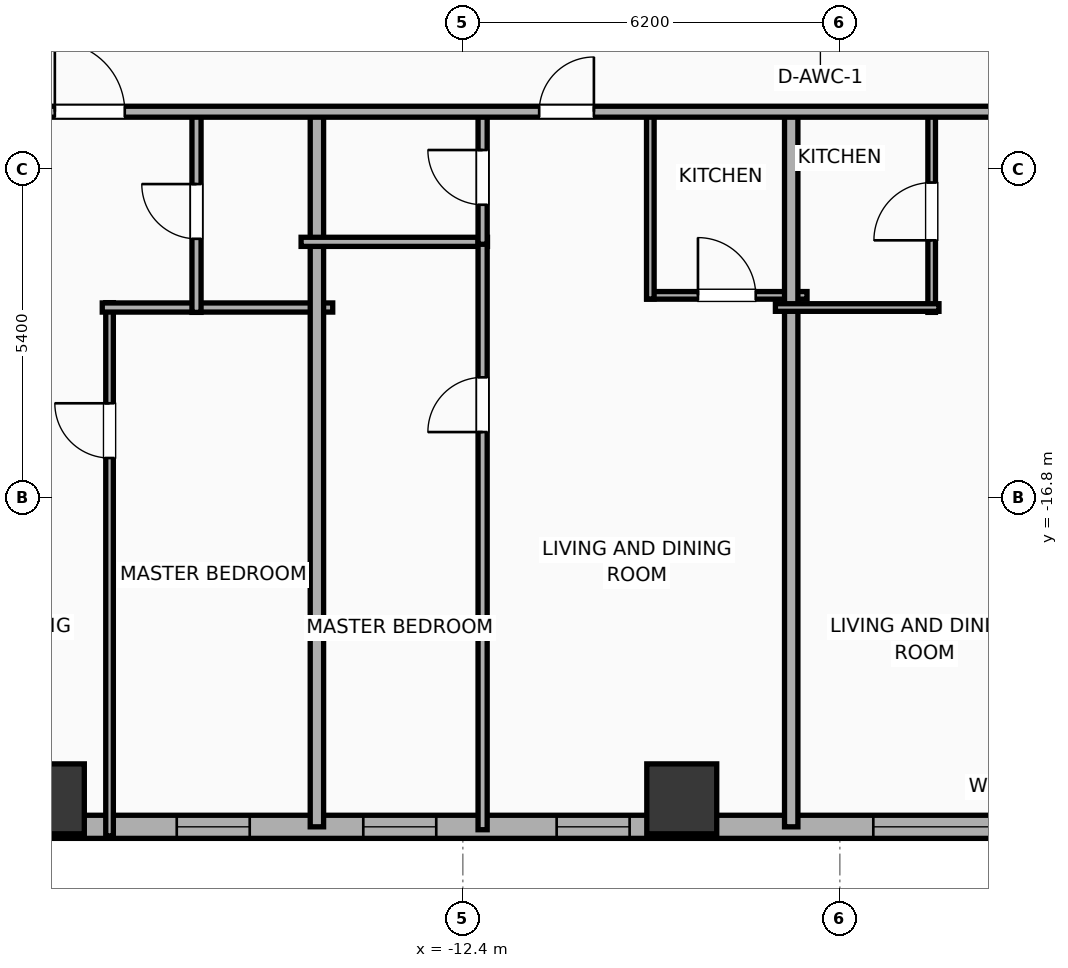
"""IFC4 building model, lengths in metres.
Left out: names, types, materials, properties, quantities, classifications, styles, units other than length and angle.
Written with IfcOpenShell. Run it as: python <this file> out.ifc"""

import sys

from ifc_helpers import new_model, si_unit, direction, frame, frame_2d, origin, origin_2d, place, context, subcontext, project, spatial, rectangle, hollow_rectangle, extrude, element, fill, save


model = new_model("IFC4")
c1 = context("Model", 3, precision=1e-05, world=origin(), true_north=direction((0.0, 1.0)))
c2 = subcontext(c1, "Body", "Model", "MODEL_VIEW")
j1 = project(units=[si_unit("LENGTHUNIT", "METRE"), si_unit("PLANEANGLEUNIT", "RADIAN")], contexts=[c1])
p1 = place(None, origin())
s1 = spatial("IfcSite", under=j1, at=p1, CompositionType="ELEMENT")
p2 = place(p1, origin())
s2 = spatial("IfcBuilding", under=s1, at=p2, CompositionType="ELEMENT")
p3 = place(p2, frame((0.0, 0.0, 57.2)))
s3 = spatial("IfcBuildingStorey", under=s2, at=p3, CompositionType="ELEMENT", Elevation=57.2)
for number, where, z_axis, x_axis in (
    (1, (-19.2, -21.75, 0.0), (0.0, 0.0, 1.0), (1.0, 0.0, 0.0)),
    (2, (-8.8, -21.75, 0.0), (0.0, 0.0, 1.0), (1.0, 0.0, 0.0)),
):
    element("IfcColumn", number, at=place(p3, frame(where, z_axis=z_axis, x_axis=x_axis)), inside=s3, PredefinedType="COLUMN", context=c2, shape_type="SweptSolid", body=[
        extrude(hollow_rectangle(XDim=1.15, YDim=1.15, WallThickness=0.04, at=origin_2d()), origin(), (0.0, 0.0, 1.0), 3.9),
    ])
p4 = place(p3, frame((22.381, -22.21, 0.0), z_axis=(0.0, 0.0, 1.0), x_axis=(-1.0, 0.0, 0.0)))
e3 = element("IfcWall", 3, at=p4, inside=s3, PredefinedType="ELEMENTEDWALL", context=c2, shape_type="SweptSolid", body=[
    extrude(rectangle(XDim=51.963, YDim=0.38, at=frame_2d((25.981, 0.0))), origin(), (0.0, 0.0, 1.0), 3.65),
])
p5 = place(p4, frame((6.61, 0.0, 0.75)))
e4 = element("IfcOpeningElement", 4, at=p5, cuts=e3, PredefinedType="OPENING", context=c2, shape_type="SweptSolid", body=[
    extrude(rectangle(XDim=2.4, YDim=2.1, at=frame_2d((1.2, 1.05))), frame((0.0, 0.2, 0.0), z_axis=(0.0, -1.0, 0.0), x_axis=(1.0, 0.0, 0.0)), (0.0, 0.0, 1.0), 0.4),
])
p6 = place(p4, frame((25.631, 0.0, 0.75)))
e5 = element("IfcOpeningElement", 5, at=p6, cuts=e3, PredefinedType="OPENING", context=c2, shape_type="SweptSolid", body=[
    extrude(rectangle(XDim=2.4, YDim=2.1, at=frame_2d((1.2, 1.05))), frame((0.0, 0.2, 0.0), z_axis=(0.0, -1.0, 0.0), x_axis=(1.0, 0.0, 0.0)), (0.0, 0.0, 1.0), 0.4),
])
p7 = place(p4, frame((49.132, 0.0, 0.75)))
e6 = element("IfcOpeningElement", 6, at=p7, cuts=e3, PredefinedType="OPENING", context=c2, shape_type="SweptSolid", body=[
    extrude(rectangle(XDim=1.2, YDim=2.05, at=frame_2d((0.6, 1.025))), frame((0.0, 0.2, 0.0), z_axis=(0.0, -1.0, 0.0), x_axis=(1.0, 0.0, 0.0)), (0.0, 0.0, 1.0), 0.4),
])
p8 = place(p4, frame((46.086, 0.0, 0.75)))
e7 = element("IfcOpeningElement", 7, at=p8, cuts=e3, PredefinedType="OPENING", context=c2, shape_type="SweptSolid", body=[
    extrude(rectangle(XDim=1.2, YDim=2.05, at=frame_2d((0.6, 1.025))), frame((0.0, 0.2, 0.0), z_axis=(0.0, -1.0, 0.0), x_axis=(1.0, 0.0, 0.0)), (0.0, 0.0, 1.0), 0.4),
])
p9 = place(p4, frame((42.426, 0.0, 0.75)))
e8 = element("IfcOpeningElement", 8, at=p9, cuts=e3, PredefinedType="OPENING", context=c2, shape_type="SweptSolid", body=[
    extrude(rectangle(XDim=1.2, YDim=2.05, at=frame_2d((0.6, 1.025))), frame((0.0, 0.2, 0.0), z_axis=(0.0, -1.0, 0.0), x_axis=(1.0, 0.0, 0.0)), (0.0, 0.0, 1.0), 0.4),
])
p10 = place(p4, frame((38.286, 0.0, 0.75)))
e9 = element("IfcOpeningElement", 9, at=p10, cuts=e3, PredefinedType="OPENING", context=c2, shape_type="SweptSolid", body=[
    extrude(rectangle(XDim=1.2, YDim=2.05, at=frame_2d((0.6, 1.025))), frame((0.0, 0.2, 0.0), z_axis=(0.0, -1.0, 0.0), x_axis=(1.0, 0.0, 0.0)), (0.0, 0.0, 1.0), 0.4),
])
p11 = place(p4, frame((35.219, 0.0, 0.75)))
e10 = element("IfcOpeningElement", 10, at=p11, cuts=e3, PredefinedType="OPENING", context=c2, shape_type="SweptSolid", body=[
    extrude(rectangle(XDim=1.2, YDim=2.05, at=frame_2d((0.6, 1.025))), frame((0.0, 0.2, 0.0), z_axis=(0.0, -1.0, 0.0), x_axis=(1.0, 0.0, 0.0)), (0.0, 0.0, 1.0), 0.4),
])
p12 = place(p4, frame((32.039, 0.0, 0.75)))
e11 = element("IfcOpeningElement", 11, at=p12, cuts=e3, PredefinedType="OPENING", context=c2, shape_type="SweptSolid", body=[
    extrude(rectangle(XDim=1.2, YDim=2.05, at=frame_2d((0.6, 1.025))), frame((0.0, 0.2, 0.0), z_axis=(0.0, -1.0, 0.0), x_axis=(1.0, 0.0, 0.0)), (0.0, 0.0, 1.0), 0.4),
])
p13 = place(p4, frame((22.686, 0.0, 0.75)))
e12 = element("IfcOpeningElement", 12, at=p13, cuts=e3, PredefinedType="OPENING", context=c2, shape_type="SweptSolid", body=[
    extrude(rectangle(XDim=1.2, YDim=2.05, at=frame_2d((0.6, 1.025))), frame((0.0, 0.2, 0.0), z_axis=(0.0, -1.0, 0.0), x_axis=(1.0, 0.0, 0.0)), (0.0, 0.0, 1.0), 0.4),
])
p14 = place(p4, frame((18.786, 0.0, 0.75)))
e13 = element("IfcOpeningElement", 13, at=p14, cuts=e3, PredefinedType="OPENING", context=c2, shape_type="SweptSolid", body=[
    extrude(rectangle(XDim=1.2, YDim=2.05, at=frame_2d((0.6, 1.025))), frame((0.0, 0.2, 0.0), z_axis=(0.0, -1.0, 0.0), x_axis=(1.0, 0.0, 0.0)), (0.0, 0.0, 1.0), 0.4),
])
p15 = place(p4, frame((14.886, 0.0, 0.75)))
e14 = element("IfcOpeningElement", 14, at=p15, cuts=e3, PredefinedType="OPENING", context=c2, shape_type="SweptSolid", body=[
    extrude(rectangle(XDim=1.2, YDim=2.05, at=frame_2d((0.6, 1.025))), frame((0.0, 0.2, 0.0), z_axis=(0.0, -1.0, 0.0), x_axis=(1.0, 0.0, 0.0)), (0.0, 0.0, 1.0), 0.4),
])
p16 = place(p4, frame((11.826, 0.0, 0.75)))
e15 = element("IfcOpeningElement", 15, at=p16, cuts=e3, PredefinedType="OPENING", context=c2, shape_type="SweptSolid", body=[
    extrude(rectangle(XDim=1.2, YDim=2.05, at=frame_2d((0.6, 1.025))), frame((0.0, 0.2, 0.0), z_axis=(0.0, -1.0, 0.0), x_axis=(1.0, 0.0, 0.0)), (0.0, 0.0, 1.0), 0.4),
])
p17 = place(p4, frame((2.836, 0.0, 0.75)))
e16 = element("IfcOpeningElement", 16, at=p17, cuts=e3, PredefinedType="OPENING", context=c2, shape_type="SweptSolid", body=[
    extrude(rectangle(XDim=1.2, YDim=2.05, at=frame_2d((0.6, 1.025))), frame((0.0, 0.2, 0.0), z_axis=(0.0, -1.0, 0.0), x_axis=(1.0, 0.0, 0.0)), (0.0, 0.0, 1.0), 0.4),
])
p18 = place(p3, frame((-18.21, -22.36, 0.0), z_axis=(0.0, 0.0, 1.0), x_axis=(0.0, 1.0, 0.0)))
e17 = element("IfcWall", 17, at=p18, inside=s3, PredefinedType="PARTITIONING", context=c2, shape_type="SweptSolid", body=[
    extrude(rectangle(XDim=8.77, YDim=0.125, at=frame_2d((4.385, 0.0))), origin(), (0.0, 0.0, 1.0), 3.65),
])
p19 = place(p18, frame((6.215, 0.0, 0.0)))
e18 = element("IfcOpeningElement", 18, at=p19, cuts=e17, PredefinedType="OPENING", context=c2, shape_type="SweptSolid", body=[
    extrude(rectangle(XDim=0.9, YDim=2.05, at=frame_2d((0.45, 1.025))), frame((0.0, 0.073, 0.0), z_axis=(0.0, -1.0, 0.0), x_axis=(1.0, 0.0, 0.0)), (0.0, 0.0, 1.0), 0.145),
])
p20 = place(p3, frame((-18.33, -13.67, 0.0), z_axis=(0.0, 0.0, 1.0), x_axis=(1.0, 0.0, 0.0)))
e19 = element("IfcWall", 19, at=p20, inside=s3, PredefinedType="PLUMBINGWALL", context=c2, shape_type="SweptSolid", body=[
    extrude(rectangle(XDim=3.79, YDim=0.15, at=frame_2d((1.895, 0.0))), origin(), (0.0, 0.0, 1.0), 3.65),
])
p21 = place(p3, frame((-16.78, -13.75, 0.0), z_axis=(0.0, 0.0, 1.0), x_axis=(0.0, 1.0, 0.0)))
e20 = element("IfcWall", 20, at=p21, inside=s3, PredefinedType="PLUMBINGWALL", context=c2, shape_type="SweptSolid", body=[
    extrude(rectangle(XDim=3.32, YDim=0.15, at=frame_2d((1.66, 0.0))), origin(), (0.0, 0.0, 1.0), 3.65),
])
p22 = place(p21, frame((1.21, 0.0, 0.0)))
e21 = element("IfcOpeningElement", 21, at=p22, cuts=e20, PredefinedType="OPENING", context=c2, shape_type="SweptSolid", body=[
    extrude(rectangle(XDim=0.9, YDim=2.05, at=frame_2d((0.45, 1.025))), frame((0.0, 0.085, 0.0), z_axis=(0.0, -1.0, 0.0), x_axis=(1.0, 0.0, 0.0)), (0.0, 0.0, 1.0), 0.17),
])
p23 = place(p3, frame((-14.8, -22.21, 0.0), z_axis=(0.0, 0.0, 1.0), x_axis=(0.0, 1.0, 0.0)))
e22 = element("IfcWall", 22, at=p23, inside=s3, PredefinedType="PARTITIONING", context=c2, shape_type="SweptSolid", body=[
    extrude(rectangle(XDim=11.84, YDim=0.22, at=frame_2d((5.92, 0.0))), origin(), (0.0, 0.0, 1.0), 3.65),
])
p24 = place(p3, frame((-15.06, -12.59, 0.0), z_axis=(0.0, 0.0, 1.0), x_axis=(1.0, 0.0, 0.0)))
e23 = element("IfcWall", 23, at=p24, inside=s3, PredefinedType="PLUMBINGWALL", context=c2, shape_type="SweptSolid", body=[
    extrude(rectangle(XDim=3.065, YDim=0.15, at=frame_2d((1.532, 0.0))), origin(), (0.0, 0.0, 1.0), 3.65),
])
p25 = place(p3, frame((-12.075, -22.258, 0.0), z_axis=(0.0, 0.0, 1.0), x_axis=(0.0, 1.0, 0.0)))
e24 = element("IfcWall", 24, at=p25, inside=s3, PredefinedType="PLUMBINGWALL", context=c2, shape_type="SweptSolid", body=[
    extrude(rectangle(XDim=9.708, YDim=0.15, at=frame_2d((4.854, 0.0))), origin(), (0.0, 0.0, 1.0), 3.65),
])
p26 = place(p25, frame((6.54, 0.0, 0.0)))
e25 = element("IfcOpeningElement", 25, at=p26, cuts=e24, PredefinedType="OPENING", context=c2, shape_type="SweptSolid", body=[
    extrude(rectangle(XDim=0.9, YDim=2.05, at=frame_2d((0.45, 1.025))), frame((0.0, 0.085, 0.0), z_axis=(0.0, -1.0, 0.0), x_axis=(1.0, 0.0, 0.0)), (0.0, 0.0, 1.0), 0.17),
])
p27 = place(p3, frame((-12.075, -12.63, 0.0), z_axis=(0.0, 0.0, 1.0), x_axis=(0.0, 1.0, 0.0)))
e26 = element("IfcWall", 26, at=p27, inside=s3, PredefinedType="PLUMBINGWALL", context=c2, shape_type="SweptSolid", body=[
    extrude(rectangle(XDim=2.2, YDim=0.15, at=frame_2d((1.1, 0.0))), origin(), (0.0, 0.0, 1.0), 3.65),
])
p28 = place(p27, frame((0.65, 0.0, 0.0)))
e27 = element("IfcOpeningElement", 27, at=p28, cuts=e26, PredefinedType="OPENING", context=c2, shape_type="SweptSolid", body=[
    extrude(rectangle(XDim=0.9, YDim=2.05, at=frame_2d((0.45, 1.025))), frame((0.0, 0.085, 0.0), z_axis=(0.0, -1.0, 0.0), x_axis=(1.0, 0.0, 0.0)), (0.0, 0.0, 1.0), 0.17),
])
p29 = place(p3, frame((-9.377, -13.47, 0.0), z_axis=(0.0, 0.0, 1.0), x_axis=(1.0, 0.0, 0.0)))
e28 = element("IfcWall", 28, at=p29, inside=s3, PredefinedType="PARTITIONING", context=c2, shape_type="SweptSolid", body=[
    extrude(rectangle(XDim=2.637, YDim=0.125, at=frame_2d((1.318, 0.0))), origin(), (0.0, 0.0, 1.0), 3.65),
])
p30 = place(p29, frame((0.844, 0.0, 0.0)))
e29 = element("IfcOpeningElement", 29, at=p30, cuts=e28, PredefinedType="OPENING", context=c2, shape_type="SweptSolid", body=[
    extrude(rectangle(XDim=0.95, YDim=2.05, at=frame_2d((0.475, 1.025))), frame((0.0, 0.073, 0.0), z_axis=(0.0, -1.0, 0.0), x_axis=(1.0, 0.0, 0.0)), (0.0, 0.0, 1.0), 0.145),
])
p31 = place(p3, frame((-9.317, -13.53, 0.0), z_axis=(0.0, 0.0, 1.0), x_axis=(0.0, 1.0, 0.0)))
e30 = element("IfcWall", 30, at=p31, inside=s3, PredefinedType="PARTITIONING", context=c2, shape_type="SweptSolid", body=[
    extrude(rectangle(XDim=3.1, YDim=0.125, at=frame_2d((1.55, 0.0))), origin(), (0.0, 0.0, 1.0), 3.65),
])
p32 = place(p3, frame((-7.0, -22.21, 0.0), z_axis=(0.0, 0.0, 1.0), x_axis=(0.0, 1.0, 0.0)))
e31 = element("IfcWall", 31, at=p32, inside=s3, PredefinedType="PARTITIONING", context=c2, shape_type="SweptSolid", body=[
    extrude(rectangle(XDim=11.84, YDim=0.22, at=frame_2d((5.92, 0.0))), origin(), (0.0, 0.0, 1.0), 3.65),
])
p33 = place(p3, frame((-4.69, -13.75, 0.0), z_axis=(0.0, 0.0, 1.0), x_axis=(0.0, 1.0, 0.0)))
e32 = element("IfcWall", 32, at=p33, inside=s3, PredefinedType="PARTITIONING", context=c2, shape_type="SweptSolid", body=[
    extrude(rectangle(XDim=3.32, YDim=0.125, at=frame_2d((1.66, 0.0))), origin(), (0.0, 0.0, 1.0), 3.65),
])
p34 = place(p33, frame((1.185, 0.0, 0.0)))
e33 = element("IfcOpeningElement", 33, at=p34, cuts=e32, PredefinedType="OPENING", context=c2, shape_type="SweptSolid", body=[
    extrude(rectangle(XDim=0.95, YDim=2.05, at=frame_2d((0.475, 1.025))), frame((0.0, 0.073, 0.0), z_axis=(0.0, -1.0, 0.0), x_axis=(1.0, 0.0, 0.0)), (0.0, 0.0, 1.0), 0.145),
])
p35 = place(p3, frame((-7.26, -13.67, 0.0), z_axis=(0.0, 0.0, 1.0), x_axis=(1.0, 0.0, 0.0)))
e34 = element("IfcWall", 34, at=p35, inside=s3, PredefinedType="PARTITIONING", context=c2, shape_type="SweptSolid", body=[
    extrude(rectangle(XDim=2.69, YDim=0.125, at=frame_2d((1.345, 0.0))), origin(), (0.0, 0.0, 1.0), 3.65),
])
p36 = place(p3, frame((-33.41, -10.45, 0.0), z_axis=(0.0, 0.0, 1.0), x_axis=(1.0, 0.0, 0.0)))
e35 = element("IfcWall", 35, at=p36, inside=s3, PredefinedType="PARTITIONING", context=c2, shape_type="SweptSolid", body=[
    extrude(rectangle(XDim=59.62, YDim=0.18, at=frame_2d((29.81, 0.0))), origin(), (0.0, 0.0, 1.0), 3.65),
])
p37 = place(p36, frame((5.321, 0.0, 0.0)))
e36 = element("IfcOpeningElement", 36, at=p37, cuts=e35, PredefinedType="OPENING", context=c2, shape_type="SweptSolid", body=[
    extrude(rectangle(XDim=1.15, YDim=2.05, at=frame_2d((0.575, 1.025))), frame((0.0, 0.1, 0.0), z_axis=(0.0, -1.0, 0.0), x_axis=(1.0, 0.0, 0.0)), (0.0, 0.0, 1.0), 0.2),
])
p38 = place(p36, frame((14.3, 0.0, 0.0)))
e37 = element("IfcOpeningElement", 37, at=p38, cuts=e35, PredefinedType="OPENING", context=c2, shape_type="SweptSolid", body=[
    extrude(rectangle(XDim=1.15, YDim=2.05, at=frame_2d((0.575, 1.025))), frame((0.0, 0.1, 0.0), z_axis=(0.0, -1.0, 0.0), x_axis=(1.0, 0.0, 0.0)), (0.0, 0.0, 1.0), 0.2),
])
p39 = place(p36, frame((22.265, 0.0, 0.0)))
e38 = element("IfcOpeningElement", 38, at=p39, cuts=e35, PredefinedType="OPENING", context=c2, shape_type="SweptSolid", body=[
    extrude(rectangle(XDim=0.9, YDim=2.05, at=frame_2d((0.45, 1.025))), frame((0.0, 0.1, 0.0), z_axis=(0.0, -1.0, 0.0), x_axis=(1.0, 0.0, 0.0)), (0.0, 0.0, 1.0), 0.2),
])
p40 = place(p36, frame((29.903, 0.0, 0.0)))
e39 = element("IfcOpeningElement", 39, at=p40, cuts=e35, PredefinedType="OPENING", context=c2, shape_type="SweptSolid", body=[
    extrude(rectangle(XDim=1.15, YDim=2.05, at=frame_2d((0.575, 1.025))), frame((0.0, 0.1, 0.0), z_axis=(0.0, -1.0, 0.0), x_axis=(1.0, 0.0, 0.0)), (0.0, 0.0, 1.0), 0.2),
])
p41 = place(p36, frame((37.701, 0.0, 0.0)))
e40 = element("IfcOpeningElement", 40, at=p41, cuts=e35, PredefinedType="OPENING", context=c2, shape_type="SweptSolid", body=[
    extrude(rectangle(XDim=1.15, YDim=2.05, at=frame_2d((0.575, 1.025))), frame((0.0, 0.1, 0.0), z_axis=(0.0, -1.0, 0.0), x_axis=(1.0, 0.0, 0.0)), (0.0, 0.0, 1.0), 0.2),
])
p42 = place(p36, frame((45.654, 0.0, 0.0)))
e41 = element("IfcOpeningElement", 41, at=p42, cuts=e35, PredefinedType="OPENING", context=c2, shape_type="SweptSolid", body=[
    extrude(rectangle(XDim=0.9, YDim=2.05, at=frame_2d((0.45, 1.025))), frame((0.0, 0.1, 0.0), z_axis=(0.0, -1.0, 0.0), x_axis=(1.0, 0.0, 0.0)), (0.0, 0.0, 1.0), 0.2),
])
p43 = place(p36, frame((54.472, 0.0, 0.0)))
e42 = element("IfcOpeningElement", 42, at=p43, cuts=e35, PredefinedType="OPENING", context=c2, shape_type="SweptSolid", body=[
    extrude(rectangle(XDim=1.15, YDim=2.05, at=frame_2d((0.575, 1.025))), frame((0.0, 0.1, 0.0), z_axis=(0.0, -1.0, 0.0), x_axis=(1.0, 0.0, 0.0)), (0.0, 0.0, 1.0), 0.2),
])
p44 = place(p6, origin())
e43 = element("IfcWindow", 43, at=p44, inside=s3, PartitioningType="SINGLE_PANEL", PredefinedType="WINDOW", context=c2, shape_type="SweptSolid", body=[
    extrude(rectangle(XDim=2.4, YDim=2.1, at=frame_2d((1.2, 1.05))), frame((0.0, 0.03, 0.0), z_axis=(0.0, -1.0, 0.0), x_axis=(1.0, 0.0, 0.0)), (0.0, 0.0, 1.0), 0.06),
])
fill(e5, e43)
p45 = place(p10, origin())
e44 = element("IfcWindow", 44, at=p45, inside=s3, PartitioningType="SINGLE_PANEL", PredefinedType="WINDOW", context=c2, shape_type="SweptSolid", body=[
    extrude(rectangle(XDim=1.2, YDim=2.05, at=frame_2d((0.6, 1.025))), frame((0.0, 0.03, 0.0), z_axis=(0.0, -1.0, 0.0), x_axis=(1.0, 0.0, 0.0)), (0.0, 0.0, 1.0), 0.06),
])
fill(e9, e44)
p46 = place(p11, origin())
e45 = element("IfcWindow", 45, at=p46, inside=s3, PartitioningType="SINGLE_PANEL", PredefinedType="WINDOW", context=c2, shape_type="SweptSolid", body=[
    extrude(rectangle(XDim=1.2, YDim=2.05, at=frame_2d((0.6, 1.025))), frame((0.0, 0.03, 0.0), z_axis=(0.0, -1.0, 0.0), x_axis=(1.0, 0.0, 0.0)), (0.0, 0.0, 1.0), 0.06),
])
fill(e10, e45)
p47 = place(p12, origin())
e46 = element("IfcWindow", 46, at=p47, inside=s3, PartitioningType="SINGLE_PANEL", PredefinedType="WINDOW", context=c2, shape_type="SweptSolid", body=[
    extrude(rectangle(XDim=1.2, YDim=2.05, at=frame_2d((0.6, 1.025))), frame((0.0, 0.03, 0.0), z_axis=(0.0, -1.0, 0.0), x_axis=(1.0, 0.0, 0.0)), (0.0, 0.0, 1.0), 0.06),
])
fill(e11, e46)
p48 = place(p19, origin())
e47 = element("IfcDoor", 47, at=p48, inside=s3, OperationType="SINGLE_SWING_RIGHT", PredefinedType="DOOR", context=c2, shape_type="SweptSolid", body=[
    extrude(rectangle(XDim=0.9, YDim=2.05, at=frame_2d((0.45, 1.025))), frame((0.0, 0.025, 0.0), z_axis=(0.0, -1.0, 0.0), x_axis=(1.0, 0.0, 0.0)), (0.0, 0.0, 1.0), 0.05),
])
fill(e18, e47)
p49 = place(p22, origin())
e48 = element("IfcDoor", 48, at=p49, inside=s3, OperationType="SINGLE_SWING_RIGHT", PredefinedType="DOOR", context=c2, shape_type="SweptSolid", body=[
    extrude(rectangle(XDim=0.9, YDim=2.05, at=frame_2d((0.45, 1.025))), frame((0.0, 0.025, 0.0), z_axis=(0.0, -1.0, 0.0), x_axis=(1.0, 0.0, 0.0)), (0.0, 0.0, 1.0), 0.05),
])
fill(e21, e48)
p50 = place(p26, origin())
e49 = element("IfcDoor", 49, at=p50, inside=s3, OperationType="SINGLE_SWING_LEFT", PredefinedType="DOOR", context=c2, shape_type="SweptSolid", body=[
    extrude(rectangle(XDim=0.9, YDim=2.05, at=frame_2d((0.45, 1.025))), frame((0.0, 0.025, 0.0), z_axis=(0.0, -1.0, 0.0), x_axis=(1.0, 0.0, 0.0)), (0.0, 0.0, 1.0), 0.05),
])
fill(e25, e49)
p51 = place(p28, origin())
e50 = element("IfcDoor", 50, at=p51, inside=s3, OperationType="SINGLE_SWING_RIGHT", PredefinedType="DOOR", context=c2, shape_type="SweptSolid", body=[
    extrude(rectangle(XDim=0.9, YDim=2.05, at=frame_2d((0.45, 1.025))), frame((0.0, 0.025, 0.0), z_axis=(0.0, -1.0, 0.0), x_axis=(1.0, 0.0, 0.0)), (0.0, 0.0, 1.0), 0.05),
])
fill(e27, e50)
p52 = place(p30, origin())
e51 = element("IfcDoor", 51, at=p52, inside=s3, OperationType="SINGLE_SWING_LEFT", PredefinedType="DOOR", context=c2, shape_type="SweptSolid", body=[
    extrude(rectangle(XDim=0.95, YDim=2.05, at=frame_2d((0.475, 1.025))), frame((0.0, 0.025, 0.0), z_axis=(0.0, -1.0, 0.0), x_axis=(1.0, 0.0, 0.0)), (0.0, 0.0, 1.0), 0.05),
])
fill(e29, e51)
p53 = place(p34, origin())
e52 = element("IfcDoor", 52, at=p53, inside=s3, OperationType="SINGLE_SWING_LEFT", PredefinedType="DOOR", context=c2, shape_type="SweptSolid", body=[
    extrude(rectangle(XDim=0.95, YDim=2.05, at=frame_2d((0.475, 1.025))), frame((0.0, 0.025, 0.0), z_axis=(0.0, -1.0, 0.0), x_axis=(1.0, 0.0, 0.0)), (0.0, 0.0, 1.0), 0.05),
])
fill(e33, e52)
p54 = place(p38, origin())
e53 = element("IfcDoor", 53, at=p54, inside=s3, OperationType="SINGLE_SWING_LEFT", PredefinedType="DOOR", context=c2, shape_type="SweptSolid", body=[
    extrude(rectangle(XDim=1.15, YDim=2.05, at=frame_2d((0.575, 1.025))), frame((0.0, 0.025, 0.0), z_axis=(0.0, -1.0, 0.0), x_axis=(1.0, 0.0, 0.0)), (0.0, 0.0, 1.0), 0.05),
])
fill(e37, e53)
p55 = place(p39, origin())
e54 = element("IfcDoor", 54, at=p55, inside=s3, OperationType="SINGLE_SWING_RIGHT", PredefinedType="DOOR", context=c2, shape_type="SweptSolid", body=[
    extrude(rectangle(XDim=0.9, YDim=2.05, at=frame_2d((0.45, 1.025))), frame((0.0, 0.025, 0.0), z_axis=(0.0, -1.0, 0.0), x_axis=(1.0, 0.0, 0.0)), (0.0, 0.0, 1.0), 0.05),
])
fill(e38, e54)
save(model, sys.argv[1])
